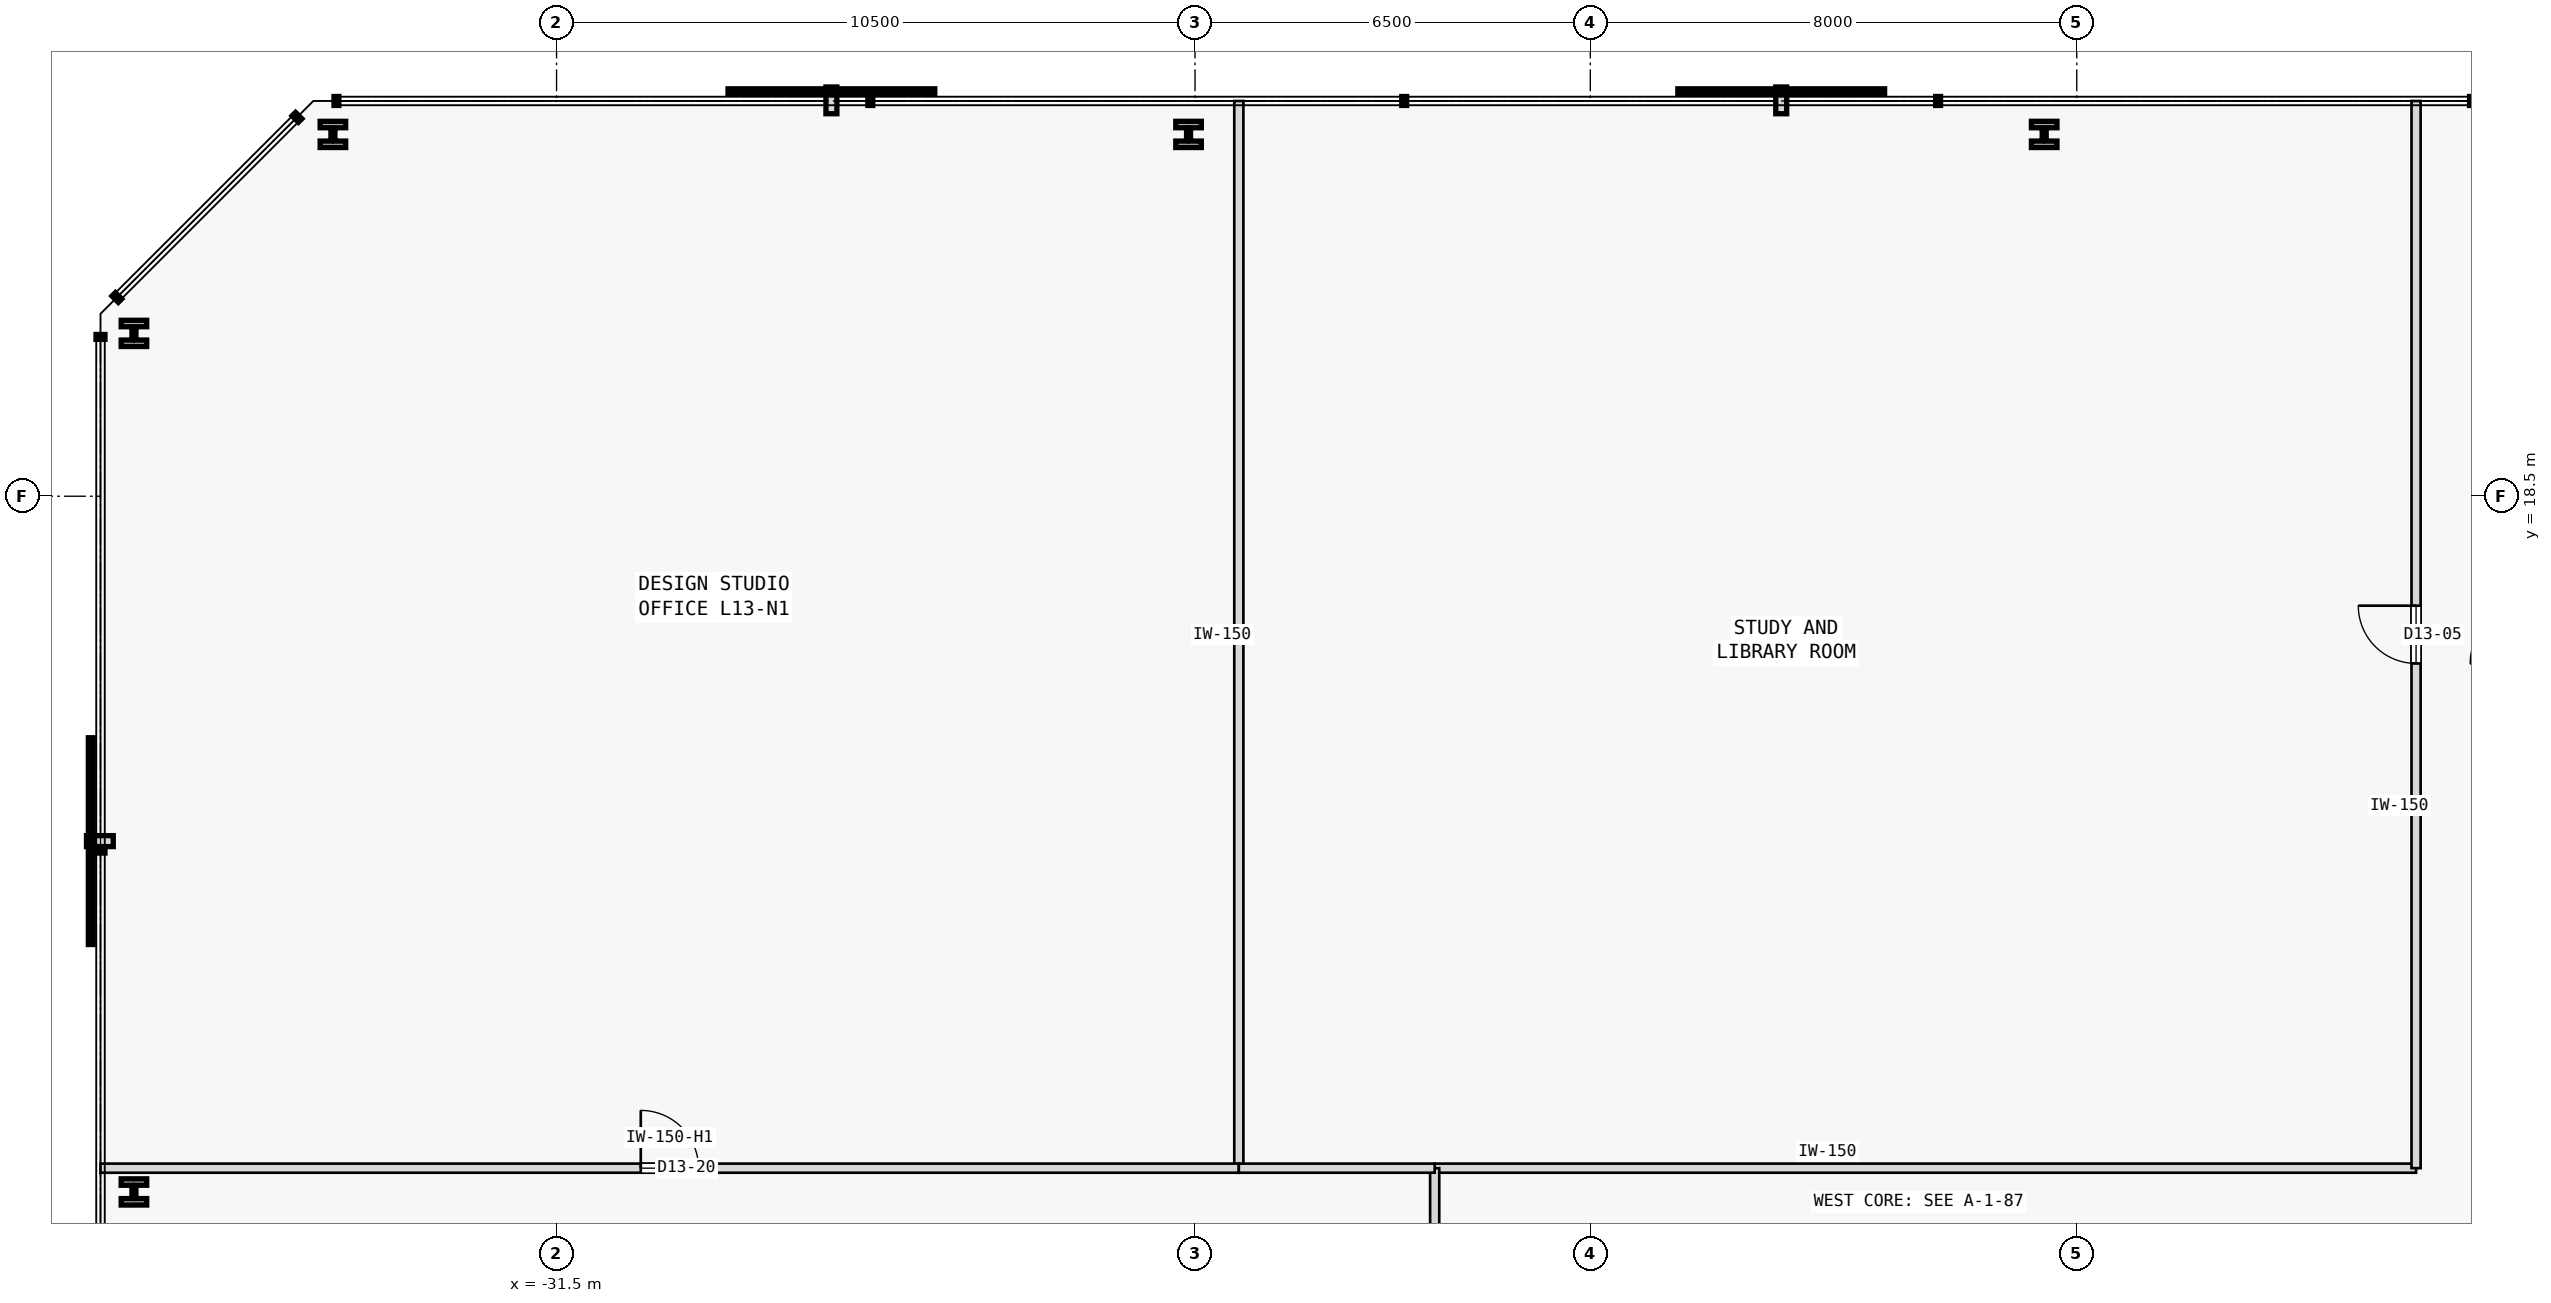
"""IFC4 building model, lengths in metres.
Left out: names, types, materials, properties, quantities, classifications, styles, units other than length and angle.
Written with IfcOpenShell. Run it as: python <this file> out.ifc"""

import sys

from ifc_helpers import new_model, si_unit, direction, frame, frame_2d, origin, origin_2d, place, context, subcontext, project, spatial, rectangle, i_section, extrude, element, fill, save


model = new_model("IFC4")
c1 = context("Model", 3, precision=1e-05, world=origin(), true_north=direction((0.0, 1.0)))
c2 = subcontext(c1, "Body", "Model", "MODEL_VIEW")
j1 = project(units=[si_unit("LENGTHUNIT", "METRE"), si_unit("PLANEANGLEUNIT", "RADIAN")], contexts=[c1])
p1 = place(None, origin())
s1 = spatial("IfcSite", under=j1, at=p1, CompositionType="ELEMENT")
p2 = place(p1, origin())
s2 = spatial("IfcBuilding", under=s1, at=p2, CompositionType="ELEMENT")
p3 = place(p2, frame((0.0, 0.0, 56.0)))
s3 = spatial("IfcBuildingStorey", under=s2, at=p3, CompositionType="ELEMENT", Elevation=56.0)
for number, where, z_axis, x_axis in (
    (1, (-7.036, 24.45, 0.0), (0.0, 0.0, 1.0), (1.0, 0.0, 0.0)),
    (2, (-21.107, 24.45, 0.0), (0.0, 0.0, 1.0), (1.0, 0.0, 0.0)),
    (3, (-35.178, 24.45, 0.0), (0.0, 0.0, 1.0), (1.0, 0.0, 0.0)),
    (4, (-38.45, 21.178, 0.0), (0.0, 0.0, 1.0), (1.0, 0.0, 0.0)),
    (5, (-38.45, 7.059, 0.0), (0.0, 0.0, 1.0), (1.0, 0.0, 0.0)),
):
    element("IfcColumn", number, at=place(p3, frame(where, z_axis=z_axis, x_axis=x_axis)), inside=s3, PredefinedType="COLUMN", context=c2, shape_type="SweptSolid", body=[
        extrude(i_section(OverallWidth=0.42, OverallDepth=0.431, WebThickness=0.065, FlangeThickness=0.106, FilletRadius=0.015, at=origin_2d()), origin(), (0.0, 0.0, 1.0), 3.8),
    ])
p4 = place(p3, frame((-17.059, 7.45, 0.0), z_axis=(0.0, 0.0, 1.0), x_axis=(1.0, 0.0, 0.0)))
e6 = element("IfcWall", 6, at=p4, inside=s3, PredefinedType="PARTITIONING", context=c2, shape_type="SweptSolid", body=[
    extrude(rectangle(XDim=16.139, YDim=0.15, at=frame_2d((8.07, 0.0))), origin(), (0.0, 0.0, 1.0), 3.575),
])
p5 = place(p3, frame((-0.92, 7.45, 0.0), z_axis=(0.0, 0.0, 1.0), x_axis=(0.0, 1.0, 0.0)))
e7 = element("IfcWall", 7, at=p5, inside=s3, PredefinedType="PARTITIONING", context=c2, shape_type="SweptSolid", body=[
    extrude(rectangle(XDim=17.55, YDim=0.15, at=frame_2d((8.775, 0.0))), origin(), (0.0, 0.0, 1.0), 3.575),
])
p6 = place(p5, frame((8.3, 0.0, 0.0)))
e8 = element("IfcOpeningElement", 8, at=p6, cuts=e7, PredefinedType="OPENING", context=c2, shape_type="SweptSolid", body=[
    extrude(rectangle(XDim=0.95, YDim=2.15, at=frame_2d((0.475, 1.075))), frame((0.0, 0.085, 0.0), z_axis=(0.0, -1.0, 0.0), x_axis=(1.0, 0.0, 0.0)), (0.0, 0.0, 1.0), 0.17),
])
p7 = place(p3, frame((-17.059, 0.92, 0.0), z_axis=(0.0, 0.0, 1.0), x_axis=(0.0, 1.0, 0.0)))
e9 = element("IfcWall", 9, at=p7, inside=s3, PredefinedType="PARTITIONING", context=c2, shape_type="SweptSolid", body=[
    extrude(rectangle(XDim=6.53, YDim=0.15, at=frame_2d((3.265, 0.0))), origin(), (0.0, 0.0, 1.0), 3.575),
])
p8 = place(p3, frame((-20.28, 7.45, 0.0), z_axis=(0.0, 0.0, 1.0), x_axis=(0.0, 1.0, 0.0)))
e10 = element("IfcWall", 10, at=p8, inside=s3, PredefinedType="PARTITIONING", context=c2, shape_type="SweptSolid", body=[
    extrude(rectangle(XDim=17.55, YDim=0.15, at=frame_2d((8.775, 0.0))), origin(), (0.0, 0.0, 1.0), 3.575),
])
p9 = place(p3, frame((-39.0, 7.45, 0.0), z_axis=(0.0, 0.0, 1.0), x_axis=(1.0, 0.0, 0.0)))
e11 = element("IfcWall", 11, at=p9, inside=s3, PredefinedType="PARTITIONING", context=c2, shape_type="SweptSolid", body=[
    extrude(rectangle(XDim=18.72, YDim=0.15, at=frame_2d((9.36, 0.0))), origin(), (0.0, 0.0, 1.0), 3.125),
])
p10 = place(p9, frame((8.885, 0.0, 0.0)))
e12 = element("IfcOpeningElement", 12, at=p10, cuts=e11, PredefinedType="OPENING", context=c2, shape_type="SweptSolid", body=[
    extrude(rectangle(XDim=0.95, YDim=2.15, at=frame_2d((0.475, 1.075))), frame((0.0, 0.085, 0.0), z_axis=(0.0, -1.0, 0.0), x_axis=(1.0, 0.0, 0.0)), (0.0, 0.0, 1.0), 0.17),
])
p11 = place(p3, frame((-20.28, 7.45, 0.0), z_axis=(0.0, 0.0, 1.0), x_axis=(1.0, 0.0, 0.0)))
e13 = element("IfcWall", 13, at=p11, inside=s3, PredefinedType="PARTITIONING", context=c2, shape_type="SweptSolid", body=[
    extrude(rectangle(XDim=3.221, YDim=0.15, at=frame_2d((1.61, 0.0))), origin(), (0.0, 0.0, 1.0), 3.575),
])
p12 = place(p6, origin())
e14 = element("IfcDoor", 14, at=p12, inside=s3, OperationType="SINGLE_SWING_RIGHT", PredefinedType="DOOR", context=c2, shape_type="SweptSolid", body=[
    extrude(rectangle(XDim=0.95, YDim=2.15, at=frame_2d((0.475, 1.075))), frame((0.0, 0.025, 0.0), z_axis=(0.0, -1.0, 0.0), x_axis=(1.0, 0.0, 0.0)), (0.0, 0.0, 1.0), 0.05),
])
fill(e8, e14)
p13 = place(p10, origin())
e15 = element("IfcDoor", 15, at=p13, inside=s3, OperationType="SINGLE_SWING_LEFT", PredefinedType="DOOR", context=c2, shape_type="SweptSolid", body=[
    extrude(rectangle(XDim=0.95, YDim=2.15, at=frame_2d((0.475, 1.075))), frame((0.0, 0.025, 0.0), z_axis=(0.0, -1.0, 0.0), x_axis=(1.0, 0.0, 0.0)), (0.0, 0.0, 1.0), 0.05),
])
fill(e12, e15)
save(model, sys.argv[1])
